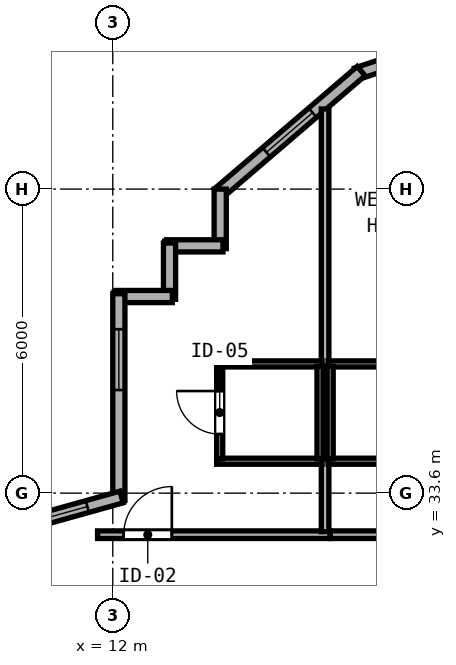
"""IFC4 building model, lengths in metres.
Left out: names, types, materials, properties, quantities, classifications, styles, units other than length and angle.
Written with IfcOpenShell. Run it as: python <this file> out.ifc"""

import sys

from ifc_helpers import new_model, si_unit, direction, frame, frame_2d, origin, place, context, subcontext, project, spatial, rectangle, extrude, element, fill, save


model = new_model("IFC4")
c1 = context("Model", 3, precision=1e-05, world=origin(), true_north=direction((0.0, 1.0)))
c2 = subcontext(c1, "Body", "Model", "MODEL_VIEW")
j1 = project(units=[si_unit("LENGTHUNIT", "METRE"), si_unit("PLANEANGLEUNIT", "RADIAN")], contexts=[c1])
p1 = place(None, origin())
s1 = spatial("IfcSite", under=j1, at=p1, CompositionType="ELEMENT")
p2 = place(p1, origin())
s2 = spatial("IfcBuilding", under=s1, at=p2, CompositionType="ELEMENT")
p3 = place(p2, frame((0.0, 0.0, 81.8)))
s3 = spatial("IfcBuildingStorey", under=s2, at=p3, CompositionType="ELEMENT", Elevation=81.8)
p4 = place(p3, frame((17.808, 42.209, 0.0), z_axis=(0.0, 0.0, 1.0), x_axis=(-0.948706457285, -0.316158279832, 0.0)))
e1 = element("IfcWall", 1, at=p4, inside=s3, PredefinedType="SOLIDWALL", context=c2, shape_type="SweptSolid", body=[
    extrude(rectangle(XDim=1.054, YDim=0.24, at=frame_2d((0.527, 0.0))), origin(), (0.0, 0.0, 1.0), 3.6),
])
p5 = place(p3, frame((16.902, 41.929, 0.0), z_axis=(0.0, 0.0, 1.0), x_axis=(-0.759275136126, -0.650769750112, 0.0)))
e2 = element("IfcWall", 2, at=p5, inside=s3, PredefinedType="SOLIDWALL", context=c2, shape_type="SweptSolid", body=[
    extrude(rectangle(XDim=3.719, YDim=0.24, at=frame_2d((1.86, 0.0))), origin(), (0.0, 0.0, 1.0), 3.6),
])
p6 = place(p5, frame((1.263, 0.0, 0.85)))
e3 = element("IfcOpeningElement", 3, at=p6, cuts=e2, PredefinedType="OPENING", context=c2, shape_type="SweptSolid", body=[
    extrude(rectangle(XDim=1.2, YDim=1.85, at=frame_2d((0.6, 0.925))), frame((0.0, 0.13, 0.0), z_axis=(0.0, -1.0, 0.0), x_axis=(1.0, 0.0, 0.0)), (0.0, 0.0, 1.0), 0.26),
])
p7 = place(p3, frame((14.12, 39.6, 0.0), z_axis=(0.0, 0.0, 1.0), x_axis=(0.0, -1.0, 0.0)))
e4 = element("IfcWall", 4, at=p7, inside=s3, PredefinedType="SOLIDWALL", context=c2, shape_type="SweptSolid", body=[
    extrude(rectangle(XDim=1.175, YDim=0.24, at=frame_2d((0.587, 0.0))), origin(), (0.0, 0.0, 1.0), 3.6),
])
p8 = place(p3, frame((14.175, 38.48, 0.0), z_axis=(0.0, 0.0, 1.0), x_axis=(-1.0, 0.0, 0.0)))
e5 = element("IfcWall", 5, at=p8, inside=s3, PredefinedType="SOLIDWALL", context=c2, shape_type="SweptSolid", body=[
    extrude(rectangle(XDim=1.11, YDim=0.24, at=frame_2d((0.555, 0.0))), origin(), (0.0, 0.0, 1.0), 3.6),
])
p9 = place(p3, frame((13.12, 38.535, 0.0), z_axis=(0.0, 0.0, 1.0), x_axis=(0.0, -1.0, 0.0)))
e6 = element("IfcWall", 6, at=p9, inside=s3, PredefinedType="SOLIDWALL", context=c2, shape_type="SweptSolid", body=[
    extrude(rectangle(XDim=1.11, YDim=0.24, at=frame_2d((0.555, 0.0))), origin(), (0.0, 0.0, 1.0), 3.6),
])
p10 = place(p3, frame((13.175, 37.48, 0.0), z_axis=(0.0, 0.0, 1.0), x_axis=(-1.0, 0.0, 0.0)))
e7 = element("IfcWall", 7, at=p10, inside=s3, PredefinedType="SOLIDWALL", context=c2, shape_type="SweptSolid", body=[
    extrude(rectangle(XDim=1.11, YDim=0.24, at=frame_2d((0.555, 0.0))), origin(), (0.0, 0.0, 1.0), 3.6),
])
p11 = place(p3, frame((12.12, 37.535, 0.0), z_axis=(0.0, 0.0, 1.0), x_axis=(0.0, -1.0, 0.0)))
e8 = element("IfcWall", 8, at=p11, inside=s3, PredefinedType="SOLIDWALL", context=c2, shape_type="SweptSolid", body=[
    extrude(rectangle(XDim=4.081, YDim=0.24, at=frame_2d((2.041, 0.0))), origin(), (0.0, 0.0, 1.0), 3.6),
])
p12 = place(p11, frame((0.7, 0.0, 0.85)))
e9 = element("IfcOpeningElement", 9, at=p12, cuts=e8, PredefinedType="OPENING", context=c2, shape_type="SweptSolid", body=[
    extrude(rectangle(XDim=1.2, YDim=1.85, at=frame_2d((0.6, 0.925))), frame((0.0, 0.13, 0.0), z_axis=(0.0, -1.0, 0.0), x_axis=(1.0, 0.0, 0.0)), (0.0, 0.0, 1.0), 0.26),
])
p13 = place(p3, frame((12.173, 33.524, 0.0), z_axis=(0.0, 0.0, 1.0), x_axis=(-0.963197271032, -0.268795493036, 0.0)))
e10 = element("IfcWall", 10, at=p13, inside=s3, PredefinedType="SOLIDWALL", context=c2, shape_type="SweptSolid", body=[
    extrude(rectangle(XDim=9.095, YDim=0.24, at=frame_2d((4.548, 0.0))), origin(), (0.0, 0.0, 1.0), 3.6),
])
p14 = place(p13, frame((0.7, 0.0, 0.85)))
e11 = element("IfcOpeningElement", 11, at=p14, cuts=e10, PredefinedType="OPENING", context=c2, shape_type="SweptSolid", body=[
    extrude(rectangle(XDim=1.2, YDim=1.85, at=frame_2d((0.6, 0.925))), frame((0.0, 0.13, 0.0), z_axis=(0.0, -1.0, 0.0), x_axis=(1.0, 0.0, 0.0)), (0.0, 0.0, 1.0), 0.26),
])
p15 = place(p13, frame((6.1, 0.0, 0.85)))
e12 = element("IfcOpeningElement", 12, at=p15, cuts=e10, PredefinedType="OPENING", context=c2, shape_type="SweptSolid", body=[
    extrude(rectangle(XDim=1.2, YDim=1.85, at=frame_2d((0.6, 0.925))), frame((0.0, 0.13, 0.0), z_axis=(0.0, -1.0, 0.0), x_axis=(1.0, 0.0, 0.0)), (0.0, 0.0, 1.0), 0.26),
])
p16 = place(p3, frame((11.7, 32.78, 0.0), z_axis=(0.0, 0.0, 1.0), x_axis=(1.0, 0.0, 0.0)))
e13 = element("IfcWall", 13, at=p16, inside=s3, PredefinedType="PARTITIONING", context=c2, shape_type="SweptSolid", body=[
    extrude(rectangle(XDim=4.59, YDim=0.15, at=frame_2d((2.295, 0.0))), origin(), (0.0, 0.0, 1.0), 3.6),
])
p17 = place(p16, frame((0.516, 0.0, 0.0)))
e14 = element("IfcOpeningElement", 14, at=p17, cuts=e13, PredefinedType="OPENING", context=c2, shape_type="SweptSolid", body=[
    extrude(rectangle(XDim=0.95, YDim=2.15, at=frame_2d((0.475, 1.075))), frame((0.0, 0.085, 0.0), z_axis=(0.0, -1.0, 0.0), x_axis=(1.0, 0.0, 0.0)), (0.0, 0.0, 1.0), 0.17),
])
p18 = place(p3, frame((16.19, 32.84, 0.0), z_axis=(0.0, 0.0, 1.0), x_axis=(0.0, 1.0, 0.0)))
e15 = element("IfcWall", 15, at=p18, inside=s3, PredefinedType="PARTITIONING", context=c2, shape_type="SweptSolid", body=[
    extrude(rectangle(XDim=8.341, YDim=0.15, at=frame_2d((4.17, 0.0))), origin(), (0.0, 0.0, 1.0), 3.6),
])
for number, where, z_axis, x_axis in (
    (16, (14.05, 36.15, 0.0), (0.0, 0.0, 1.0), (1.0, 0.0, 0.0)),
    (17, (14.05, 34.23, 0.0), (0.0, 0.0, 1.0), (1.0, 0.0, 0.0)),
):
    element("IfcWall", number, at=place(p3, frame(where, z_axis=z_axis, x_axis=x_axis)), inside=s3, PredefinedType="PARTITIONING", context=c2, shape_type="SweptSolid", body=[
        extrude(rectangle(XDim=2.08, YDim=0.12, at=frame_2d((1.04, 0.0))), origin(), (0.0, 0.0, 1.0), 3.6),
    ])
p19 = place(p3, frame((14.11, 34.275, 0.0), z_axis=(0.0, 0.0, 1.0), x_axis=(0.0, 1.0, 0.0)))
e18 = element("IfcWall", 18, at=p19, inside=s3, PredefinedType="PARTITIONING", context=c2, shape_type="SweptSolid", body=[
    extrude(rectangle(XDim=1.83, YDim=0.12, at=frame_2d((0.915, 0.0))), origin(), (0.0, 0.0, 1.0), 3.6),
])
p20 = place(p19, frame((1.34, 0.0, 0.0), z_axis=(0.0, 0.0, 1.0), x_axis=(-1.0, 0.0, 0.0)))
e19 = element("IfcOpeningElement", 19, at=p20, cuts=e18, PredefinedType="OPENING", context=c2, shape_type="SweptSolid", body=[
    extrude(rectangle(XDim=0.85, YDim=2.1, at=frame_2d((0.425, 1.05))), frame((0.0, 0.07, 0.0), z_axis=(0.0, -1.0, 0.0), x_axis=(1.0, 0.0, 0.0)), (0.0, 0.0, 1.0), 0.14),
])
p21 = place(p3, frame((16.09, 34.275, 0.0), z_axis=(0.0, 0.0, 1.0), x_axis=(0.0, 1.0, 0.0)))
e20 = element("IfcWall", 20, at=p21, inside=s3, PredefinedType="PARTITIONING", context=c2, shape_type="SweptSolid", body=[
    extrude(rectangle(XDim=1.83, YDim=0.12, at=frame_2d((0.915, 0.0))), origin(), (0.0, 0.0, 1.0), 3.6),
])
p22 = place(p3, frame((16.292, 32.78, 0.0), z_axis=(0.0, 0.0, 1.0), x_axis=(1.0, 0.0, 0.0)))
e21 = element("IfcWall", 21, at=p22, inside=s3, PredefinedType="PARTITIONING", context=c2, shape_type="SweptSolid", body=[
    extrude(rectangle(XDim=4.148, YDim=0.15, at=frame_2d((2.074, 0.0))), origin(), (0.0, 0.0, 1.0), 3.6),
])
p23 = place(p22, frame((2.784, 0.0, 0.0)))
e22 = element("IfcOpeningElement", 22, at=p23, cuts=e21, PredefinedType="OPENING", context=c2, shape_type="SweptSolid", body=[
    extrude(rectangle(XDim=0.95, YDim=2.15, at=frame_2d((0.475, 1.075))), frame((0.0, 0.085, 0.0), z_axis=(0.0, -1.0, 0.0), x_axis=(1.0, 0.0, 0.0)), (0.0, 0.0, 1.0), 0.17),
])
for number, where, z_axis, x_axis in (
    (23, (16.25, 36.15, 0.0), (0.0, 0.0, 1.0), (1.0, 0.0, 0.0)),
    (24, (16.25, 34.23, 0.0), (0.0, 0.0, 1.0), (1.0, 0.0, 0.0)),
):
    element("IfcWall", number, at=place(p3, frame(where, z_axis=z_axis, x_axis=x_axis)), inside=s3, PredefinedType="PARTITIONING", context=c2, shape_type="SweptSolid", body=[
        extrude(rectangle(XDim=2.08, YDim=0.12, at=frame_2d((1.04, 0.0))), origin(), (0.0, 0.0, 1.0), 3.6),
    ])
p24 = place(p3, frame((16.29, 34.275, 0.0), z_axis=(0.0, 0.0, 1.0), x_axis=(0.0, 1.0, 0.0)))
e25 = element("IfcWall", 25, at=p24, inside=s3, PredefinedType="PARTITIONING", context=c2, shape_type="SweptSolid", body=[
    extrude(rectangle(XDim=1.83, YDim=0.12, at=frame_2d((0.915, 0.0))), origin(), (0.0, 0.0, 1.0), 3.6),
])
p25 = place(p6, origin())
e26 = element("IfcWindow", 26, at=p25, inside=s3, PartitioningType="SINGLE_PANEL", PredefinedType="WINDOW", context=c2, shape_type="SweptSolid", body=[
    extrude(rectangle(XDim=1.2, YDim=1.85, at=frame_2d((0.6, 0.925))), frame((0.0, 0.03, 0.0), z_axis=(0.0, -1.0, 0.0), x_axis=(1.0, 0.0, 0.0)), (0.0, 0.0, 1.0), 0.06),
])
fill(e3, e26)
p26 = place(p12, origin())
e27 = element("IfcWindow", 27, at=p26, inside=s3, PartitioningType="SINGLE_PANEL", PredefinedType="WINDOW", context=c2, shape_type="SweptSolid", body=[
    extrude(rectangle(XDim=1.2, YDim=1.85, at=frame_2d((0.6, 0.925))), frame((0.0, 0.03, 0.0), z_axis=(0.0, -1.0, 0.0), x_axis=(1.0, 0.0, 0.0)), (0.0, 0.0, 1.0), 0.06),
])
fill(e9, e27)
p27 = place(p14, origin())
e28 = element("IfcWindow", 28, at=p27, inside=s3, PartitioningType="SINGLE_PANEL", PredefinedType="WINDOW", context=c2, shape_type="SweptSolid", body=[
    extrude(rectangle(XDim=1.2, YDim=1.85, at=frame_2d((0.6, 0.925))), frame((0.0, 0.03, 0.0), z_axis=(0.0, -1.0, 0.0), x_axis=(1.0, 0.0, 0.0)), (0.0, 0.0, 1.0), 0.06),
])
fill(e11, e28)
p28 = place(p17, origin())
e29 = element("IfcDoor", 29, at=p28, inside=s3, OperationType="SINGLE_SWING_RIGHT", PredefinedType="DOOR", context=c2, shape_type="SweptSolid", body=[
    extrude(rectangle(XDim=0.95, YDim=2.15, at=frame_2d((0.475, 1.075))), frame((0.0, 0.025, 0.0), z_axis=(0.0, -1.0, 0.0), x_axis=(1.0, 0.0, 0.0)), (0.0, 0.0, 1.0), 0.05),
])
fill(e14, e29)
p29 = place(p20, origin())
e30 = element("IfcDoor", 30, at=p29, inside=s3, OperationType="SINGLE_SWING_LEFT", PredefinedType="DOOR", context=c2, shape_type="SweptSolid", body=[
    extrude(rectangle(XDim=0.85, YDim=2.1, at=frame_2d((0.425, 1.05))), frame((0.0, 0.025, 0.0), z_axis=(0.0, -1.0, 0.0), x_axis=(1.0, 0.0, 0.0)), (0.0, 0.0, 1.0), 0.05),
])
fill(e19, e30)
save(model, sys.argv[1])
